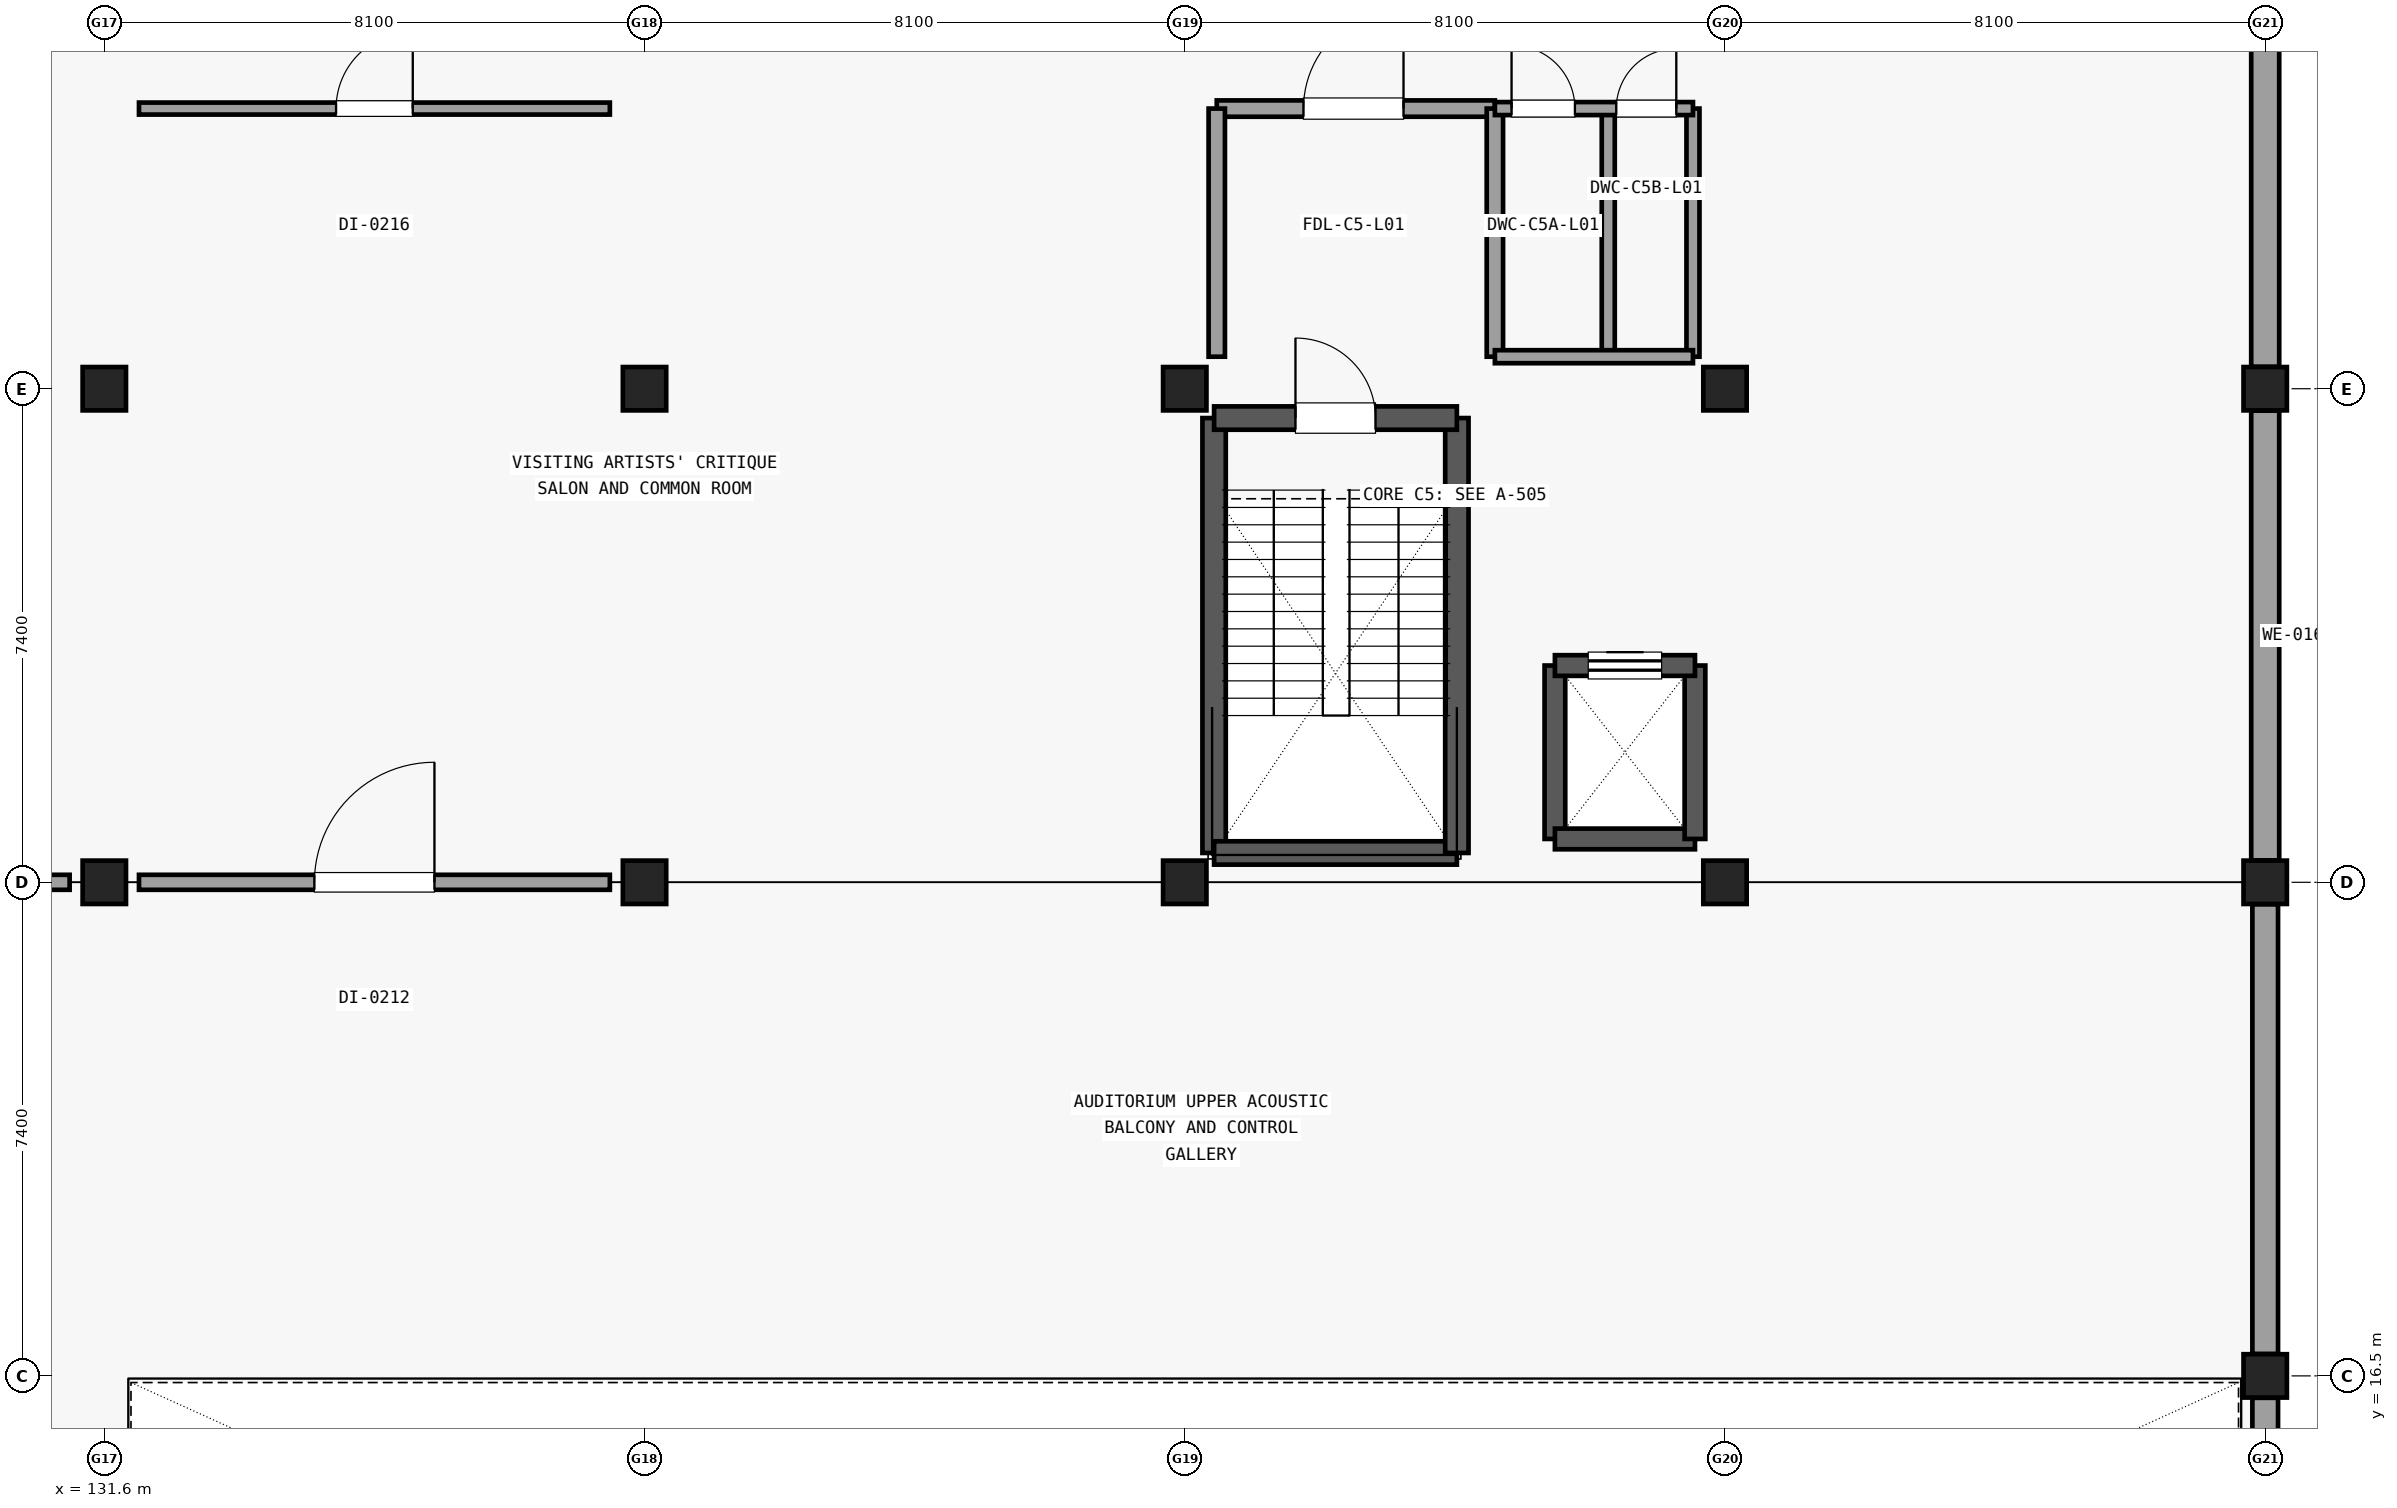
"""IFC4 building model, lengths in metres.
Left out: names, types, materials, properties, quantities, classifications, styles, units other than length and angle.
Written with IfcOpenShell. Run it as: python <this file> out.ifc"""

import sys

from ifc_helpers import new_model, si_unit, direction, frame, frame_2d, origin, origin_2d, place, context, subcontext, project, spatial, rectangle, extrude, element, fill, save


model = new_model("IFC4")
c1 = context("Model", 3, precision=1e-05, world=origin(), true_north=direction((0.0, 1.0)))
c2 = subcontext(c1, "Body", "Model", "MODEL_VIEW")
j1 = project(units=[si_unit("LENGTHUNIT", "METRE"), si_unit("PLANEANGLEUNIT", "RADIAN")], contexts=[c1])
p1 = place(None, origin())
s1 = spatial("IfcSite", under=j1, at=p1, CompositionType="ELEMENT")
p2 = place(p1, origin())
s2 = spatial("IfcBuilding", under=s1, at=p2, CompositionType="ELEMENT")
p3 = place(p2, frame((0.0, 0.0, 5.4)))
s3 = spatial("IfcBuildingStorey", under=s2, at=p3, CompositionType="ELEMENT", Elevation=5.4)
for number, where, z_axis, x_axis in (
    (1, (131.6, 23.9, 0.0), (0.0, 0.0, 1.0), (1.0, 0.0, 0.0)),
    (2, (131.6, 31.3, 0.0), (0.0, 0.0, 1.0), (1.0, 0.0, 0.0)),
    (3, (139.7, 23.9, 0.0), (0.0, 0.0, 1.0), (1.0, 0.0, 0.0)),
    (4, (139.7, 31.3, 0.0), (0.0, 0.0, 1.0), (1.0, 0.0, 0.0)),
    (5, (147.8, 23.9, 0.0), (0.0, 0.0, 1.0), (1.0, 0.0, 0.0)),
    (6, (147.8, 31.3, 0.0), (0.0, 0.0, 1.0), (1.0, 0.0, 0.0)),
    (7, (155.9, 23.9, 0.0), (0.0, 0.0, 1.0), (1.0, 0.0, 0.0)),
    (8, (155.9, 31.3, 0.0), (0.0, 0.0, 1.0), (1.0, 0.0, 0.0)),
    (9, (164.0, 16.5, 0.0), (0.0, 0.0, 1.0), (1.0, 0.0, 0.0)),
    (10, (164.0, 23.9, 0.0), (0.0, 0.0, 1.0), (1.0, 0.0, 0.0)),
    (11, (164.0, 31.3, 0.0), (0.0, 0.0, 1.0), (1.0, 0.0, 0.0)),
):
    element("IfcColumn", number, at=place(p3, frame(where, z_axis=z_axis, x_axis=x_axis)), inside=s3, PredefinedType="COLUMN", context=c2, shape_type="SweptSolid", body=[
        extrude(rectangle(XDim=0.65, YDim=0.65, at=origin_2d()), origin(), (0.0, 0.0, 1.0), 4.56),
    ])
p4 = place(p3, frame((164.0, 23.571, 0.0), z_axis=(0.0, 0.0, 1.0), x_axis=(0.0, -1.0, 0.0)))
e12 = element("IfcWall", 12, at=p4, inside=s3, PredefinedType="SOLIDWALL", context=c2, shape_type="SweptSolid", body=[
    extrude(rectangle(XDim=6.742, YDim=0.385, at=frame_2d((3.371, 0.0))), origin(), (0.0, 0.0, 1.0), 3.795),
])
p5 = place(p3, frame((164.0, 30.971, 0.0), z_axis=(0.0, 0.0, 1.0), x_axis=(0.0, -1.0, 0.0)))
e13 = element("IfcWall", 13, at=p5, inside=s3, PredefinedType="SOLIDWALL", context=c2, shape_type="SweptSolid", body=[
    extrude(rectangle(XDim=6.742, YDim=0.42, at=frame_2d((3.371, 0.0))), origin(), (0.0, 0.0, 1.0), 3.795),
])
p6 = place(p3, frame((164.0, 38.371, 0.0), z_axis=(0.0, 0.0, 1.0), x_axis=(0.0, -1.0, 0.0)))
e14 = element("IfcWall", 14, at=p6, inside=s3, PredefinedType="SOLIDWALL", context=c2, shape_type="SweptSolid", body=[
    extrude(rectangle(XDim=6.742, YDim=0.42, at=frame_2d((3.371, 0.0))), origin(), (0.0, 0.0, 1.0), 3.795),
])
p7 = place(p3, frame((164.0, 16.171, 0.0), z_axis=(0.0, 0.0, 1.0), x_axis=(0.0, -1.0, 0.0)))
e15 = element("IfcWall", 15, at=p7, inside=s3, PredefinedType="SOLIDWALL", context=c2, shape_type="SweptSolid", body=[
    extrude(rectangle(XDim=6.742, YDim=0.385, at=frame_2d((3.371, 0.0))), origin(), (0.0, 0.0, 1.0), 3.92),
])
p8 = place(p3, frame((148.24, 24.34, 0.0), z_axis=(0.0, 0.0, 1.0), x_axis=(0.0, 1.0, 0.0)))
e16 = element("IfcWall", 16, at=p8, inside=s3, PredefinedType="SHEAR", context=c2, shape_type="SweptSolid", body=[
    extrude(rectangle(XDim=6.52, YDim=0.35, at=frame_2d((3.26, 0.0))), origin(), (0.0, 0.0, 1.0), 4.555),
])
p9 = place(p3, frame((148.24, 24.34, 0.0), z_axis=(0.0, 0.0, 1.0), x_axis=(1.0, 0.0, 0.0)))
e17 = element("IfcWall", 17, at=p9, inside=s3, PredefinedType="SHEAR", context=c2, shape_type="SweptSolid", body=[
    extrude(rectangle(XDim=3.64, YDim=0.35, at=frame_2d((1.82, 0.0))), origin(), (0.0, 0.0, 1.0), 4.555),
])
p10 = place(p3, frame((151.88, 24.34, 0.0), z_axis=(0.0, 0.0, 1.0), x_axis=(0.0, 1.0, 0.0)))
e18 = element("IfcWall", 18, at=p10, inside=s3, PredefinedType="SHEAR", context=c2, shape_type="SweptSolid", body=[
    extrude(rectangle(XDim=6.52, YDim=0.35, at=frame_2d((3.26, 0.0))), origin(), (0.0, 0.0, 1.0), 4.555),
])
p11 = place(p3, frame((148.24, 30.86, 0.0), z_axis=(0.0, 0.0, 1.0), x_axis=(1.0, 0.0, 0.0)))
e19 = element("IfcWall", 19, at=p11, inside=s3, PredefinedType="SHEAR", context=c2, shape_type="SweptSolid", body=[
    extrude(rectangle(XDim=3.64, YDim=0.35, at=frame_2d((1.82, 0.0))), origin(), (0.0, 0.0, 1.0), 4.555),
])
p12 = place(p11, frame((1.22, 0.0, 0.0)))
e20 = element("IfcOpeningElement", 20, at=p12, cuts=e19, PredefinedType="OPENING", context=c2, shape_type="SweptSolid", body=[
    extrude(rectangle(XDim=1.2, YDim=2.15, at=frame_2d((0.6, 1.075))), frame((0.0, 0.185, 0.0), z_axis=(0.0, -1.0, 0.0), x_axis=(1.0, 0.0, 0.0)), (0.0, 0.0, 1.0), 0.37),
])
p13 = place(p3, frame((153.35, 24.55, 0.0), z_axis=(0.0, 0.0, 1.0), x_axis=(0.0, 1.0, 0.0)))
e21 = element("IfcWall", 21, at=p13, inside=s3, PredefinedType="SHEAR", context=c2, shape_type="SweptSolid", body=[
    extrude(rectangle(XDim=2.6, YDim=0.31, at=frame_2d((1.3, 0.0))), origin(), (0.0, 0.0, 1.0), 4.555),
])
p14 = place(p3, frame((153.35, 24.55, 0.0), z_axis=(0.0, 0.0, 1.0), x_axis=(1.0, 0.0, 0.0)))
e22 = element("IfcWall", 22, at=p14, inside=s3, PredefinedType="SHEAR", context=c2, shape_type="SweptSolid", body=[
    extrude(rectangle(XDim=2.1, YDim=0.31, at=frame_2d((1.05, 0.0))), origin(), (0.0, 0.0, 1.0), 4.555),
])
p15 = place(p3, frame((155.45, 24.55, 0.0), z_axis=(0.0, 0.0, 1.0), x_axis=(0.0, 1.0, 0.0)))
e23 = element("IfcWall", 23, at=p15, inside=s3, PredefinedType="SHEAR", context=c2, shape_type="SweptSolid", body=[
    extrude(rectangle(XDim=2.6, YDim=0.31, at=frame_2d((1.3, 0.0))), origin(), (0.0, 0.0, 1.0), 4.555),
])
p16 = place(p3, frame((153.35, 27.15, 0.0), z_axis=(0.0, 0.0, 1.0), x_axis=(1.0, 0.0, 0.0)))
e24 = element("IfcWall", 24, at=p16, inside=s3, PredefinedType="SHEAR", context=c2, shape_type="SweptSolid", body=[
    extrude(rectangle(XDim=2.1, YDim=0.31, at=frame_2d((1.05, 0.0))), origin(), (0.0, 0.0, 1.0), 4.555),
])
p17 = place(p16, frame((0.5, 0.0, 0.0)))
e25 = element("IfcOpeningElement", 25, at=p17, cuts=e24, PredefinedType="OPENING", context=c2, shape_type="SweptSolid", body=[
    extrude(rectangle(XDim=1.1, YDim=2.15, at=frame_2d((0.55, 1.075))), frame((0.0, 0.165, 0.0), z_axis=(0.0, -1.0, 0.0), x_axis=(1.0, 0.0, 0.0)), (0.0, 0.0, 1.0), 0.33),
])
p18 = place(p3, frame((148.28, 35.5, 0.0), z_axis=(0.0, 0.0, 1.0), x_axis=(1.0, 0.0, 0.0)))
e26 = element("IfcWall", 26, at=p18, inside=s3, PredefinedType="PARTITIONING", context=c2, shape_type="SweptSolid", body=[
    extrude(rectangle(XDim=4.17, YDim=0.245, at=frame_2d((2.085, 0.0))), origin(), (0.0, 0.0, 1.0), 3.85),
])
p19 = place(p18, frame((1.3, 0.0, 0.0)))
e27 = element("IfcOpeningElement", 27, at=p19, cuts=e26, PredefinedType="OPENING", context=c2, shape_type="SweptSolid", body=[
    extrude(rectangle(XDim=1.5, YDim=2.15, at=frame_2d((0.75, 1.075))), frame((0.0, 0.133, 0.0), z_axis=(0.0, -1.0, 0.0), x_axis=(1.0, 0.0, 0.0)), (0.0, 0.0, 1.0), 0.265),
])
for number, where, z_axis, x_axis in (
    (28, (148.28, 31.78, 0.0), (0.0, 0.0, 1.0), (0.0, 1.0, 0.0)),
    (29, (152.45, 31.78, 0.0), (0.0, 0.0, 1.0), (0.0, 1.0, 0.0)),
):
    element("IfcWall", number, at=place(p3, frame(where, z_axis=z_axis, x_axis=x_axis)), inside=s3, PredefinedType="PARTITIONING", context=c2, shape_type="SweptSolid", body=[
        extrude(rectangle(XDim=3.72, YDim=0.245, at=frame_2d((1.86, 0.0))), origin(), (0.0, 0.0, 1.0), 3.8),
    ])
for number, where, z_axis, x_axis in (
    (30, (154.15, 31.78, 0.0), (0.0, 0.0, 1.0), (0.0, 1.0, 0.0)),
    (31, (155.42, 31.78, 0.0), (0.0, 0.0, 1.0), (0.0, 1.0, 0.0)),
):
    element("IfcWall", number, at=place(p3, frame(where, z_axis=z_axis, x_axis=x_axis)), inside=s3, PredefinedType="PARTITIONING", context=c2, shape_type="SweptSolid", body=[
        extrude(rectangle(XDim=3.72, YDim=0.195, at=frame_2d((1.86, 0.0))), origin(), (0.0, 0.0, 1.0), 3.8),
    ])
p20 = place(p3, frame((152.45, 31.78, 0.0), z_axis=(0.0, 0.0, 1.0), x_axis=(1.0, 0.0, 0.0)))
e32 = element("IfcWall", 32, at=p20, inside=s3, PredefinedType="PARTITIONING", context=c2, shape_type="SweptSolid", body=[
    extrude(rectangle(XDim=2.97, YDim=0.195, at=frame_2d((1.485, 0.0))), origin(), (0.0, 0.0, 1.0), 3.8),
])
p21 = place(p3, frame((152.45, 35.5, 0.0), z_axis=(0.0, 0.0, 1.0), x_axis=(1.0, 0.0, 0.0)))
e33 = element("IfcWall", 33, at=p21, inside=s3, PredefinedType="PARTITIONING", context=c2, shape_type="SweptSolid", body=[
    extrude(rectangle(XDim=2.97, YDim=0.195, at=frame_2d((1.485, 0.0))), origin(), (0.0, 0.0, 1.0), 3.85),
])
p22 = place(p21, frame((0.25, 0.0, 0.0)))
e34 = element("IfcOpeningElement", 34, at=p22, cuts=e33, PredefinedType="OPENING", context=c2, shape_type="SweptSolid", body=[
    extrude(rectangle(XDim=0.95, YDim=2.1, at=frame_2d((0.475, 1.05))), frame((0.0, 0.107, 0.0), z_axis=(0.0, -1.0, 0.0), x_axis=(1.0, 0.0, 0.0)), (0.0, 0.0, 1.0), 0.215),
])
p23 = place(p21, frame((1.82, 0.0, 0.0)))
e35 = element("IfcOpeningElement", 35, at=p23, cuts=e33, PredefinedType="OPENING", context=c2, shape_type="SweptSolid", body=[
    extrude(rectangle(XDim=0.9, YDim=2.1, at=frame_2d((0.45, 1.05))), frame((0.0, 0.107, 0.0), z_axis=(0.0, -1.0, 0.0), x_axis=(1.0, 0.0, 0.0)), (0.0, 0.0, 1.0), 0.215),
])
p24 = place(p3, frame((124.02, 23.9, 0.0), z_axis=(0.0, 0.0, 1.0), x_axis=(1.0, 0.0, 0.0)))
e36 = element("IfcWall", 36, at=p24, inside=s3, PredefinedType="PARTITIONING", context=c2, shape_type="SweptSolid", body=[
    extrude(rectangle(XDim=7.06, YDim=0.225, at=frame_2d((3.53, 0.0))), origin(), (0.0, 0.0, 1.0), 3.8),
])
p25 = place(p24, frame((2.63, 0.0, 0.0)))
e37 = element("IfcOpeningElement", 37, at=p25, cuts=e36, PredefinedType="OPENING", context=c2, shape_type="SweptSolid", body=[
    extrude(rectangle(XDim=1.8, YDim=2.4, at=frame_2d((0.9, 1.2))), frame((0.0, 0.123, 0.0), z_axis=(0.0, -1.0, 0.0), x_axis=(1.0, 0.0, 0.0)), (0.0, 0.0, 1.0), 0.245),
])
p26 = place(p3, frame((132.12, 23.9, 0.0), z_axis=(0.0, 0.0, 1.0), x_axis=(1.0, 0.0, 0.0)))
e38 = element("IfcWall", 38, at=p26, inside=s3, PredefinedType="PARTITIONING", context=c2, shape_type="SweptSolid", body=[
    extrude(rectangle(XDim=7.06, YDim=0.225, at=frame_2d((3.53, 0.0))), origin(), (0.0, 0.0, 1.0), 3.8),
])
p27 = place(p26, frame((2.63, 0.0, 0.0)))
e39 = element("IfcOpeningElement", 39, at=p27, cuts=e38, PredefinedType="OPENING", context=c2, shape_type="SweptSolid", body=[
    extrude(rectangle(XDim=1.8, YDim=2.4, at=frame_2d((0.9, 1.2))), frame((0.0, 0.123, 0.0), z_axis=(0.0, -1.0, 0.0), x_axis=(1.0, 0.0, 0.0)), (0.0, 0.0, 1.0), 0.245),
])
p28 = place(p3, frame((132.12, 35.5, 0.0), z_axis=(0.0, 0.0, 1.0), x_axis=(1.0, 0.0, 0.0)))
e40 = element("IfcWall", 40, at=p28, inside=s3, PredefinedType="PARTITIONING", context=c2, shape_type="SweptSolid", body=[
    extrude(rectangle(XDim=7.06, YDim=0.18, at=frame_2d((3.53, 0.0))), origin(), (0.0, 0.0, 1.0), 3.85),
])
p29 = place(p28, frame((2.955, 0.0, 0.0)))
e41 = element("IfcOpeningElement", 41, at=p29, cuts=e40, PredefinedType="OPENING", context=c2, shape_type="SweptSolid", body=[
    extrude(rectangle(XDim=1.15, YDim=2.15, at=frame_2d((0.575, 1.075))), frame((0.0, 0.1, 0.0), z_axis=(0.0, -1.0, 0.0), x_axis=(1.0, 0.0, 0.0)), (0.0, 0.0, 1.0), 0.2),
])
p30 = place(p12, origin())
e42 = element("IfcDoor", 42, at=p30, inside=s3, OperationType="SINGLE_SWING_LEFT", PredefinedType="DOOR", context=c2, shape_type="SweptSolid", body=[
    extrude(rectangle(XDim=1.2, YDim=2.15, at=frame_2d((0.6, 1.075))), frame((0.0, 0.025, 0.0), z_axis=(0.0, -1.0, 0.0), x_axis=(1.0, 0.0, 0.0)), (0.0, 0.0, 1.0), 0.05),
])
fill(e20, e42)
p31 = place(p17, origin())
e43 = element("IfcDoor", 43, at=p31, inside=s3, OperationType="SLIDING_TO_RIGHT", PredefinedType="DOOR", context=c2, shape_type="SweptSolid", body=[
    extrude(rectangle(XDim=1.1, YDim=2.15, at=frame_2d((0.55, 1.075))), frame((0.0, 0.025, 0.0), z_axis=(0.0, -1.0, 0.0), x_axis=(1.0, 0.0, 0.0)), (0.0, 0.0, 1.0), 0.05),
])
fill(e25, e43)
p32 = place(p19, origin())
e44 = element("IfcDoor", 44, at=p32, inside=s3, OperationType="SINGLE_SWING_RIGHT", PredefinedType="DOOR", context=c2, shape_type="SweptSolid", body=[
    extrude(rectangle(XDim=1.5, YDim=2.15, at=frame_2d((0.75, 1.075))), frame((0.0, 0.025, 0.0), z_axis=(0.0, -1.0, 0.0), x_axis=(1.0, 0.0, 0.0)), (0.0, 0.0, 1.0), 0.05),
])
fill(e27, e44)
p33 = place(p22, origin())
e45 = element("IfcDoor", 45, at=p33, inside=s3, OperationType="SINGLE_SWING_LEFT", PredefinedType="DOOR", context=c2, shape_type="SweptSolid", body=[
    extrude(rectangle(XDim=0.95, YDim=2.1, at=frame_2d((0.475, 1.05))), frame((0.0, 0.025, 0.0), z_axis=(0.0, -1.0, 0.0), x_axis=(1.0, 0.0, 0.0)), (0.0, 0.0, 1.0), 0.05),
])
fill(e34, e45)
p34 = place(p23, origin())
e46 = element("IfcDoor", 46, at=p34, inside=s3, OperationType="SINGLE_SWING_RIGHT", PredefinedType="DOOR", context=c2, shape_type="SweptSolid", body=[
    extrude(rectangle(XDim=0.9, YDim=2.1, at=frame_2d((0.45, 1.05))), frame((0.0, 0.025, 0.0), z_axis=(0.0, -1.0, 0.0), x_axis=(1.0, 0.0, 0.0)), (0.0, 0.0, 1.0), 0.05),
])
fill(e35, e46)
p35 = place(p27, origin())
e47 = element("IfcDoor", 47, at=p35, inside=s3, OperationType="SINGLE_SWING_RIGHT", PredefinedType="DOOR", context=c2, shape_type="SweptSolid", body=[
    extrude(rectangle(XDim=1.8, YDim=2.4, at=frame_2d((0.9, 1.2))), frame((0.0, 0.025, 0.0), z_axis=(0.0, -1.0, 0.0), x_axis=(1.0, 0.0, 0.0)), (0.0, 0.0, 1.0), 0.05),
])
fill(e39, e47)
p36 = place(p29, origin())
e48 = element("IfcDoor", 48, at=p36, inside=s3, OperationType="SINGLE_SWING_RIGHT", PredefinedType="DOOR", context=c2, shape_type="SweptSolid", body=[
    extrude(rectangle(XDim=1.15, YDim=2.15, at=frame_2d((0.575, 1.075))), frame((0.0, 0.025, 0.0), z_axis=(0.0, -1.0, 0.0), x_axis=(1.0, 0.0, 0.0)), (0.0, 0.0, 1.0), 0.05),
])
fill(e41, e48)
save(model, sys.argv[1])
